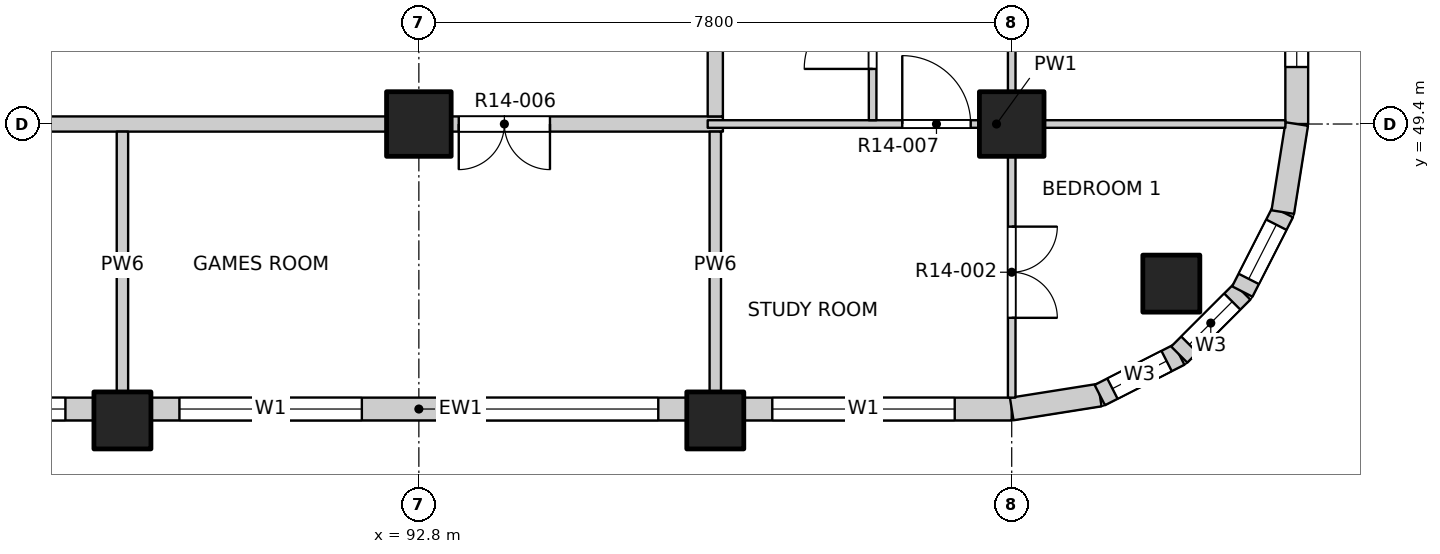
"""IFC4 building model, lengths in metres.
Left out: names, types, materials, properties, quantities, classifications, styles, units other than length and angle.
Written with IfcOpenShell. Run it as: python <this file> out.ifc"""

import sys

from ifc_helpers import new_model, si_unit, direction, frame, frame_2d, origin, origin_2d, place, context, subcontext, project, spatial, rectangle, extrude, element, fill, save


model = new_model("IFC4")
c1 = context("Model", 3, precision=1e-05, world=origin(), true_north=direction((0.0, 1.0)))
c2 = subcontext(c1, "Body", "Model", "MODEL_VIEW")
j1 = project(units=[si_unit("LENGTHUNIT", "METRE"), si_unit("PLANEANGLEUNIT", "RADIAN")], contexts=[c1])
p1 = place(None, origin())
s1 = spatial("IfcSite", under=j1, at=p1, CompositionType="ELEMENT")
p2 = place(p1, origin())
s2 = spatial("IfcBuilding", under=s1, at=p2, CompositionType="ELEMENT")
p3 = place(p2, frame((0.0, 0.0, 152.0)))
s3 = spatial("IfcBuildingStorey", under=s2, at=p3, CompositionType="ELEMENT", Elevation=152.0)
for number, where, z_axis, x_axis in (
    (1, (102.7, 47.3, -0.25), (0.0, 0.0, 1.0), (1.0, 0.0, 0.0)),
    (2, (88.9, 45.5, -0.25), (0.0, 0.0, 1.0), (1.0, 0.0, 0.0)),
    (3, (96.7, 45.5, -0.25), (0.0, 0.0, 1.0), (1.0, 0.0, 0.0)),
):
    element("IfcColumn", number, at=place(p3, frame(where, z_axis=z_axis, x_axis=x_axis)), inside=s3, PredefinedType="COLUMN", context=c2, shape_type="SweptSolid", body=[
        extrude(rectangle(XDim=0.75, YDim=0.75, at=origin_2d()), origin(), (0.0, 0.0, 1.0), 3.4),
    ])
for number, where, z_axis, x_axis in (
    (4, (92.8, 49.4, -0.25), (0.0, 0.0, 1.0), (1.0, 0.0, 0.0)),
    (5, (100.6, 49.4, -0.25), (0.0, 0.0, 1.0), (1.0, 0.0, 0.0)),
):
    element("IfcColumn", number, at=place(p3, frame(where, z_axis=z_axis, x_axis=x_axis)), inside=s3, PredefinedType="COLUMN", context=c2, shape_type="SweptSolid", body=[
        extrude(rectangle(XDim=0.85, YDim=0.85, at=origin_2d()), origin(), (0.0, 0.0, 1.0), 3.4),
    ])
p4 = place(p3, frame((81.475, 45.65, 0.0), z_axis=(0.0, 0.0, 1.0), x_axis=(1.0, 0.0, 0.0)))
e6 = element("IfcWall", 6, at=p4, inside=s3, PredefinedType="SOLIDWALL", context=c2, shape_type="SweptSolid", body=[
    extrude(rectangle(XDim=7.05, YDim=0.3, at=frame_2d((3.525, 0.0))), origin(), (0.0, 0.0, 1.0), 2.7),
])
p5 = place(p4, frame((0.375, 0.0, 0.9)))
e7 = element("IfcOpeningElement", 7, at=p5, cuts=e6, PredefinedType="OPENING", context=c2, shape_type="SweptSolid", body=[
    extrude(rectangle(XDim=2.4, YDim=1.8, at=frame_2d((1.2, 0.9))), frame((0.0, 0.16, 0.0), z_axis=(0.0, -1.0, 0.0), x_axis=(1.0, 0.0, 0.0)), (0.0, 0.0, 1.0), 0.32),
])
p6 = place(p4, frame((4.275, 0.0, 0.9)))
e8 = element("IfcOpeningElement", 8, at=p6, cuts=e6, PredefinedType="OPENING", context=c2, shape_type="SweptSolid", body=[
    extrude(rectangle(XDim=2.4, YDim=1.8, at=frame_2d((1.2, 0.9))), frame((0.0, 0.16, 0.0), z_axis=(0.0, -1.0, 0.0), x_axis=(1.0, 0.0, 0.0)), (0.0, 0.0, 1.0), 0.32),
])
p7 = place(p3, frame((89.275, 45.65, 0.0), z_axis=(0.0, 0.0, 1.0), x_axis=(1.0, 0.0, 0.0)))
e9 = element("IfcWall", 9, at=p7, inside=s3, PredefinedType="SOLIDWALL", context=c2, shape_type="SweptSolid", body=[
    extrude(rectangle(XDim=7.05, YDim=0.3, at=frame_2d((3.525, 0.0))), origin(), (0.0, 0.0, 1.0), 2.7),
])
p8 = place(p7, frame((0.375, 0.0, 0.9)))
e10 = element("IfcOpeningElement", 10, at=p8, cuts=e9, PredefinedType="OPENING", context=c2, shape_type="SweptSolid", body=[
    extrude(rectangle(XDim=2.4, YDim=1.8, at=frame_2d((1.2, 0.9))), frame((0.0, 0.16, 0.0), z_axis=(0.0, -1.0, 0.0), x_axis=(1.0, 0.0, 0.0)), (0.0, 0.0, 1.0), 0.32),
])
p9 = place(p7, frame((4.275, 0.0, 0.9)))
e11 = element("IfcOpeningElement", 11, at=p9, cuts=e9, PredefinedType="OPENING", context=c2, shape_type="SweptSolid", body=[
    extrude(rectangle(XDim=2.4, YDim=1.8, at=frame_2d((1.2, 0.9))), frame((0.0, 0.16, 0.0), z_axis=(0.0, -1.0, 0.0), x_axis=(1.0, 0.0, 0.0)), (0.0, 0.0, 1.0), 0.32),
])
p10 = place(p3, frame((97.075, 45.65, 0.0), z_axis=(0.0, 0.0, 1.0), x_axis=(1.0, 0.0, 0.0)))
e12 = element("IfcWall", 12, at=p10, inside=s3, PredefinedType="SOLIDWALL", context=c2, shape_type="SweptSolid", body=[
    extrude(rectangle(XDim=3.525, YDim=0.3, at=frame_2d((1.763, 0.0))), origin(), (0.0, 0.0, 1.0), 2.7),
])
p11 = place(p10, frame((0.375, 0.0, 0.9)))
e13 = element("IfcOpeningElement", 13, at=p11, cuts=e12, PredefinedType="OPENING", context=c2, shape_type="SweptSolid", body=[
    extrude(rectangle(XDim=2.4, YDim=1.8, at=frame_2d((1.2, 0.9))), frame((0.0, 0.16, 0.0), z_axis=(0.0, -1.0, 0.0), x_axis=(1.0, 0.0, 0.0)), (0.0, 0.0, 1.0), 0.32),
])
p12 = place(p3, frame((104.35, 49.4, 0.0), z_axis=(0.0, 0.0, 1.0), x_axis=(0.0, 1.0, 0.0)))
e14 = element("IfcWall", 14, at=p12, inside=s3, PredefinedType="SOLIDWALL", context=c2, shape_type="SweptSolid", body=[
    extrude(rectangle(XDim=3.525, YDim=0.3, at=frame_2d((1.763, 0.0))), origin(), (0.0, 0.0, 1.0), 2.7),
])
p13 = place(p12, frame((0.75, 0.0, 0.9)))
e15 = element("IfcOpeningElement", 15, at=p13, cuts=e14, PredefinedType="OPENING", context=c2, shape_type="SweptSolid", body=[
    extrude(rectangle(XDim=2.4, YDim=1.8, at=frame_2d((1.2, 0.9))), frame((0.0, 0.16, 0.0), z_axis=(0.0, -1.0, 0.0), x_axis=(1.0, 0.0, 0.0)), (0.0, 0.0, 1.0), 0.32),
])
p14 = place(p3, frame((100.6, 45.65, 0.0), z_axis=(0.0, 0.0, 1.0), x_axis=(0.987678452879, 0.156496880861, 0.0)))
e16 = element("IfcWall", 16, at=p14, inside=s3, PredefinedType="SOLIDWALL", context=c2, shape_type="SweptSolid", body=[
    extrude(rectangle(XDim=1.173, YDim=0.3, at=frame_2d((0.586, 0.0))), origin(), (0.0, 0.0, 1.0), 2.7),
])
p15 = place(p3, frame((101.759, 45.833, 0.0), z_axis=(0.0, 0.0, 1.0), x_axis=(0.890988677504, 0.454025524128, 0.0)))
e17 = element("IfcWall", 17, at=p15, inside=s3, PredefinedType="SOLIDWALL", context=c2, shape_type="SweptSolid", body=[
    extrude(rectangle(XDim=1.173, YDim=0.3, at=frame_2d((0.587, 0.0))), origin(), (0.0, 0.0, 1.0), 2.7),
])
p16 = place(p15, frame((0.187, 0.0, 0.9)))
e18 = element("IfcOpeningElement", 18, at=p16, cuts=e17, PredefinedType="OPENING", context=c2, shape_type="SweptSolid", body=[
    extrude(rectangle(XDim=0.8, YDim=1.2, at=frame_2d((0.4, 0.6))), frame((0.0, 0.16, 0.0), z_axis=(0.0, -1.0, 0.0), x_axis=(1.0, 0.0, 0.0)), (0.0, 0.0, 1.0), 0.32),
])
p17 = place(p3, frame((102.804, 46.366, 0.0), z_axis=(0.0, 0.0, 1.0), x_axis=(0.707106781187, 0.707106781187, 0.0)))
e19 = element("IfcWall", 19, at=p17, inside=s3, PredefinedType="SOLIDWALL", context=c2, shape_type="SweptSolid", body=[
    extrude(rectangle(XDim=1.173, YDim=0.3, at=frame_2d((0.586, 0.0))), origin(), (0.0, 0.0, 1.0), 2.7),
])
p18 = place(p17, frame((0.187, 0.0, 0.9)))
e20 = element("IfcOpeningElement", 20, at=p18, cuts=e19, PredefinedType="OPENING", context=c2, shape_type="SweptSolid", body=[
    extrude(rectangle(XDim=0.8, YDim=1.2, at=frame_2d((0.4, 0.6))), frame((0.0, 0.16, 0.0), z_axis=(0.0, -1.0, 0.0), x_axis=(1.0, 0.0, 0.0)), (0.0, 0.0, 1.0), 0.32),
])
p19 = place(p3, frame((103.634, 47.196, 0.0), z_axis=(0.0, 0.0, 1.0), x_axis=(0.454025524128, 0.890988677504, 0.0)))
e21 = element("IfcWall", 21, at=p19, inside=s3, PredefinedType="SOLIDWALL", context=c2, shape_type="SweptSolid", body=[
    extrude(rectangle(XDim=1.173, YDim=0.3, at=frame_2d((0.587, 0.0))), origin(), (0.0, 0.0, 1.0), 2.7),
])
p20 = place(p19, frame((0.187, 0.0, 0.9)))
e22 = element("IfcOpeningElement", 22, at=p20, cuts=e21, PredefinedType="OPENING", context=c2, shape_type="SweptSolid", body=[
    extrude(rectangle(XDim=0.8, YDim=1.2, at=frame_2d((0.4, 0.6))), frame((0.0, 0.16, 0.0), z_axis=(0.0, -1.0, 0.0), x_axis=(1.0, 0.0, 0.0)), (0.0, 0.0, 1.0), 0.32),
])
p21 = place(p3, frame((104.167, 48.241, 0.0), z_axis=(0.0, 0.0, 1.0), x_axis=(0.156496880861, 0.987678452879, 0.0)))
e23 = element("IfcWall", 23, at=p21, inside=s3, PredefinedType="SOLIDWALL", context=c2, shape_type="SweptSolid", body=[
    extrude(rectangle(XDim=1.173, YDim=0.3, at=frame_2d((0.586, 0.0))), origin(), (0.0, 0.0, 1.0), 2.7),
])
p22 = place(p3, frame((73.2, 49.4, 0.0), z_axis=(0.0, 0.0, 1.0), x_axis=(1.0, 0.0, 0.0)))
e24 = element("IfcWall", 24, at=p22, inside=s3, PredefinedType="PARTITIONING", context=c2, shape_type="SweptSolid", body=[
    extrude(rectangle(XDim=23.6, YDim=0.2, at=frame_2d((11.8, 0.0))), origin(), (0.0, 0.0, 1.0), 3.15),
])
p23 = place(p22, frame((4.525, 0.0, 0.0)))
e25 = element("IfcOpeningElement", 25, at=p23, cuts=e24, PredefinedType="OPENING", context=c2, shape_type="SweptSolid", body=[
    extrude(rectangle(XDim=1.2, YDim=2.1, at=frame_2d((0.6, 1.05))), frame((0.0, 0.11, 0.0), z_axis=(0.0, -1.0, 0.0), x_axis=(1.0, 0.0, 0.0)), (0.0, 0.0, 1.0), 0.22),
])
p24 = place(p22, frame((12.325, 0.0, 0.0)))
e26 = element("IfcOpeningElement", 26, at=p24, cuts=e24, PredefinedType="OPENING", context=c2, shape_type="SweptSolid", body=[
    extrude(rectangle(XDim=1.2, YDim=2.1, at=frame_2d((0.6, 1.05))), frame((0.0, 0.11, 0.0), z_axis=(0.0, -1.0, 0.0), x_axis=(1.0, 0.0, 0.0)), (0.0, 0.0, 1.0), 0.22),
])
p25 = place(p22, frame((20.125, 0.0, 0.0)))
e27 = element("IfcOpeningElement", 27, at=p25, cuts=e24, PredefinedType="OPENING", context=c2, shape_type="SweptSolid", body=[
    extrude(rectangle(XDim=1.2, YDim=2.1, at=frame_2d((0.6, 1.05))), frame((0.0, 0.11, 0.0), z_axis=(0.0, -1.0, 0.0), x_axis=(1.0, 0.0, 0.0)), (0.0, 0.0, 1.0), 0.22),
])
p26 = place(p3, frame((96.6, 49.4, 0.0), z_axis=(0.0, 0.0, 1.0), x_axis=(1.0, 0.0, 0.0)))
e28 = element("IfcWall", 28, at=p26, inside=s3, PredefinedType="PARTITIONING", context=c2, shape_type="SweptSolid", body=[
    extrude(rectangle(XDim=7.6, YDim=0.1, at=frame_2d((3.8, 0.0))), origin(), (0.0, 0.0, 1.0), 3.15),
])
p27 = place(p26, frame((2.56, 0.0, 0.0)))
e29 = element("IfcOpeningElement", 29, at=p27, cuts=e28, PredefinedType="OPENING", context=c2, shape_type="SweptSolid", body=[
    extrude(rectangle(XDim=0.9, YDim=2.1, at=frame_2d((0.45, 1.05))), frame((0.0, 0.06, 0.0), z_axis=(0.0, -1.0, 0.0), x_axis=(1.0, 0.0, 0.0)), (0.0, 0.0, 1.0), 0.12),
])
for number, where, z_axis, x_axis in (
    (30, (88.9, 45.8, 0.0), (0.0, 0.0, 1.0), (0.0, 1.0, 0.0)),
    (31, (96.7, 45.8, 0.0), (0.0, 0.0, 1.0), (0.0, 1.0, 0.0)),
):
    element("IfcWall", number, at=place(p3, frame(where, z_axis=z_axis, x_axis=x_axis)), inside=s3, PredefinedType="PARTITIONING", context=c2, shape_type="SweptSolid", body=[
        extrude(rectangle(XDim=3.5, YDim=0.15, at=frame_2d((1.75, 0.0))), origin(), (0.0, 0.0, 1.0), 3.15),
    ])
p28 = place(p3, frame((96.7, 49.5, 0.0), z_axis=(0.0, 0.0, 1.0), x_axis=(0.0, 1.0, 0.0)))
e32 = element("IfcWall", 32, at=p28, inside=s3, PredefinedType="PARTITIONING", context=c2, shape_type="SweptSolid", body=[
    extrude(rectangle(XDim=34.7, YDim=0.2, at=frame_2d((17.35, 0.0))), origin(), (0.0, 0.0, 1.0), 3.15),
])
p29 = place(p28, frame((3.225, 0.0, 0.0)))
e33 = element("IfcOpeningElement", 33, at=p29, cuts=e32, PredefinedType="OPENING", context=c2, shape_type="SweptSolid", body=[
    extrude(rectangle(XDim=1.0, YDim=2.1, at=frame_2d((0.5, 1.05))), frame((0.0, 0.11, 0.0), z_axis=(0.0, -1.0, 0.0), x_axis=(1.0, 0.0, 0.0)), (0.0, 0.0, 1.0), 0.22),
])
p30 = place(p28, frame((19.775, 0.0, 0.0)))
e34 = element("IfcOpeningElement", 34, at=p30, cuts=e32, PredefinedType="OPENING", context=c2, shape_type="SweptSolid", body=[
    extrude(rectangle(XDim=1.0, YDim=2.1, at=frame_2d((0.5, 1.05))), frame((0.0, 0.11, 0.0), z_axis=(0.0, -1.0, 0.0), x_axis=(1.0, 0.0, 0.0)), (0.0, 0.0, 1.0), 0.22),
])
p31 = place(p28, frame((24.125, 0.0, 0.0)))
e35 = element("IfcOpeningElement", 35, at=p31, cuts=e32, PredefinedType="OPENING", context=c2, shape_type="SweptSolid", body=[
    extrude(rectangle(XDim=1.0, YDim=2.1, at=frame_2d((0.5, 1.05))), frame((0.0, 0.11, 0.0), z_axis=(0.0, -1.0, 0.0), x_axis=(1.0, 0.0, 0.0)), (0.0, 0.0, 1.0), 0.22),
])
p32 = place(p3, frame((98.77, 49.45, 0.0), z_axis=(0.0, 0.0, 1.0), x_axis=(0.0, 1.0, 0.0)))
e36 = element("IfcWall", 36, at=p32, inside=s3, PredefinedType="PARTITIONING", context=c2, shape_type="SweptSolid", body=[
    extrude(rectangle(XDim=4.4, YDim=0.1, at=frame_2d((2.2, 0.0))), origin(), (0.0, 0.0, 1.0), 3.15),
])
p33 = place(p32, frame((0.675, 0.0, 0.0)))
e37 = element("IfcOpeningElement", 37, at=p33, cuts=e36, PredefinedType="OPENING", context=c2, shape_type="SweptSolid", body=[
    extrude(rectangle(XDim=0.9, YDim=2.1, at=frame_2d((0.45, 1.05))), frame((0.0, 0.06, 0.0), z_axis=(0.0, -1.0, 0.0), x_axis=(1.0, 0.0, 0.0)), (0.0, 0.0, 1.0), 0.12),
])
p34 = place(p32, frame((2.975, 0.0, 0.0)))
e38 = element("IfcOpeningElement", 38, at=p34, cuts=e36, PredefinedType="OPENING", context=c2, shape_type="SweptSolid", body=[
    extrude(rectangle(XDim=0.8, YDim=2.1, at=frame_2d((0.4, 1.05))), frame((0.0, 0.06, 0.0), z_axis=(0.0, -1.0, 0.0), x_axis=(1.0, 0.0, 0.0)), (0.0, 0.0, 1.0), 0.12),
])
p35 = place(p3, frame((100.6, 45.8, 0.0), z_axis=(0.0, 0.0, 1.0), x_axis=(0.0, 1.0, 0.0)))
e39 = element("IfcWall", 39, at=p35, inside=s3, PredefinedType="PARTITIONING", context=c2, shape_type="SweptSolid", body=[
    extrude(rectangle(XDim=38.4, YDim=0.1, at=frame_2d((19.2, 0.0))), origin(), (0.0, 0.0, 1.0), 3.15),
])
p36 = place(p35, frame((1.05, 0.0, 0.0)))
e40 = element("IfcOpeningElement", 40, at=p36, cuts=e39, PredefinedType="OPENING", context=c2, shape_type="SweptSolid", body=[
    extrude(rectangle(XDim=1.2, YDim=2.1, at=frame_2d((0.6, 1.05))), frame((0.0, 0.06, 0.0), z_axis=(0.0, -1.0, 0.0), x_axis=(1.0, 0.0, 0.0)), (0.0, 0.0, 1.0), 0.12),
])
p37 = place(p35, frame((5.1, 0.0, 0.0)))
e41 = element("IfcOpeningElement", 41, at=p37, cuts=e39, PredefinedType="OPENING", context=c2, shape_type="SweptSolid", body=[
    extrude(rectangle(XDim=0.9, YDim=2.1, at=frame_2d((0.45, 1.05))), frame((0.0, 0.06, 0.0), z_axis=(0.0, -1.0, 0.0), x_axis=(1.0, 0.0, 0.0)), (0.0, 0.0, 1.0), 0.12),
])
p38 = place(p35, frame((9.0, 0.0, 0.0)))
e42 = element("IfcOpeningElement", 42, at=p38, cuts=e39, PredefinedType="OPENING", context=c2, shape_type="SweptSolid", body=[
    extrude(rectangle(XDim=0.9, YDim=2.1, at=frame_2d((0.45, 1.05))), frame((0.0, 0.06, 0.0), z_axis=(0.0, -1.0, 0.0), x_axis=(1.0, 0.0, 0.0)), (0.0, 0.0, 1.0), 0.12),
])
p39 = place(p35, frame((12.9, 0.0, 0.0)))
e43 = element("IfcOpeningElement", 43, at=p39, cuts=e39, PredefinedType="OPENING", context=c2, shape_type="SweptSolid", body=[
    extrude(rectangle(XDim=0.9, YDim=2.1, at=frame_2d((0.45, 1.05))), frame((0.0, 0.06, 0.0), z_axis=(0.0, -1.0, 0.0), x_axis=(1.0, 0.0, 0.0)), (0.0, 0.0, 1.0), 0.12),
])
p40 = place(p35, frame((16.8, 0.0, 0.0)))
e44 = element("IfcOpeningElement", 44, at=p40, cuts=e39, PredefinedType="OPENING", context=c2, shape_type="SweptSolid", body=[
    extrude(rectangle(XDim=0.9, YDim=2.1, at=frame_2d((0.45, 1.05))), frame((0.0, 0.06, 0.0), z_axis=(0.0, -1.0, 0.0), x_axis=(1.0, 0.0, 0.0)), (0.0, 0.0, 1.0), 0.12),
])
p41 = place(p35, frame((20.7, 0.0, 0.0)))
e45 = element("IfcOpeningElement", 45, at=p41, cuts=e39, PredefinedType="OPENING", context=c2, shape_type="SweptSolid", body=[
    extrude(rectangle(XDim=0.9, YDim=2.1, at=frame_2d((0.45, 1.05))), frame((0.0, 0.06, 0.0), z_axis=(0.0, -1.0, 0.0), x_axis=(1.0, 0.0, 0.0)), (0.0, 0.0, 1.0), 0.12),
])
p42 = place(p35, frame((24.6, 0.0, 0.0)))
e46 = element("IfcOpeningElement", 46, at=p42, cuts=e39, PredefinedType="OPENING", context=c2, shape_type="SweptSolid", body=[
    extrude(rectangle(XDim=0.9, YDim=2.1, at=frame_2d((0.45, 1.05))), frame((0.0, 0.06, 0.0), z_axis=(0.0, -1.0, 0.0), x_axis=(1.0, 0.0, 0.0)), (0.0, 0.0, 1.0), 0.12),
])
p43 = place(p35, frame((28.5, 0.0, 0.0)))
e47 = element("IfcOpeningElement", 47, at=p43, cuts=e39, PredefinedType="OPENING", context=c2, shape_type="SweptSolid", body=[
    extrude(rectangle(XDim=0.9, YDim=2.1, at=frame_2d((0.45, 1.05))), frame((0.0, 0.06, 0.0), z_axis=(0.0, -1.0, 0.0), x_axis=(1.0, 0.0, 0.0)), (0.0, 0.0, 1.0), 0.12),
])
p44 = place(p35, frame((32.4, 0.0, 0.0)))
e48 = element("IfcOpeningElement", 48, at=p44, cuts=e39, PredefinedType="OPENING", context=c2, shape_type="SweptSolid", body=[
    extrude(rectangle(XDim=0.9, YDim=2.1, at=frame_2d((0.45, 1.05))), frame((0.0, 0.06, 0.0), z_axis=(0.0, -1.0, 0.0), x_axis=(1.0, 0.0, 0.0)), (0.0, 0.0, 1.0), 0.12),
])
p45 = place(p35, frame((36.15, 0.0, 0.0)))
e49 = element("IfcOpeningElement", 49, at=p45, cuts=e39, PredefinedType="OPENING", context=c2, shape_type="SweptSolid", body=[
    extrude(rectangle(XDim=1.2, YDim=2.1, at=frame_2d((0.6, 1.05))), frame((0.0, 0.06, 0.0), z_axis=(0.0, -1.0, 0.0), x_axis=(1.0, 0.0, 0.0)), (0.0, 0.0, 1.0), 0.12),
])
p46 = place(p6, origin())
e50 = element("IfcWindow", 50, at=p46, inside=s3, PartitioningType="DOUBLE_PANEL_VERTICAL", PredefinedType="WINDOW", context=c2, shape_type="SweptSolid", body=[
    extrude(rectangle(XDim=2.4, YDim=1.8, at=frame_2d((1.2, 0.9))), frame((0.0, 0.03, 0.0), z_axis=(0.0, -1.0, 0.0), x_axis=(1.0, 0.0, 0.0)), (0.0, 0.0, 1.0), 0.06),
])
fill(e8, e50)
p47 = place(p8, origin())
e51 = element("IfcWindow", 51, at=p47, inside=s3, PartitioningType="DOUBLE_PANEL_VERTICAL", PredefinedType="WINDOW", context=c2, shape_type="SweptSolid", body=[
    extrude(rectangle(XDim=2.4, YDim=1.8, at=frame_2d((1.2, 0.9))), frame((0.0, 0.03, 0.0), z_axis=(0.0, -1.0, 0.0), x_axis=(1.0, 0.0, 0.0)), (0.0, 0.0, 1.0), 0.06),
])
fill(e10, e51)
p48 = place(p9, origin())
e52 = element("IfcWindow", 52, at=p48, inside=s3, PartitioningType="DOUBLE_PANEL_VERTICAL", PredefinedType="WINDOW", context=c2, shape_type="SweptSolid", body=[
    extrude(rectangle(XDim=2.4, YDim=1.8, at=frame_2d((1.2, 0.9))), frame((0.0, 0.03, 0.0), z_axis=(0.0, -1.0, 0.0), x_axis=(1.0, 0.0, 0.0)), (0.0, 0.0, 1.0), 0.06),
])
fill(e11, e52)
p49 = place(p11, origin())
e53 = element("IfcWindow", 53, at=p49, inside=s3, PartitioningType="DOUBLE_PANEL_VERTICAL", PredefinedType="WINDOW", context=c2, shape_type="SweptSolid", body=[
    extrude(rectangle(XDim=2.4, YDim=1.8, at=frame_2d((1.2, 0.9))), frame((0.0, 0.03, 0.0), z_axis=(0.0, -1.0, 0.0), x_axis=(1.0, 0.0, 0.0)), (0.0, 0.0, 1.0), 0.06),
])
fill(e13, e53)
p50 = place(p13, origin())
e54 = element("IfcWindow", 54, at=p50, inside=s3, PartitioningType="DOUBLE_PANEL_VERTICAL", PredefinedType="WINDOW", context=c2, shape_type="SweptSolid", body=[
    extrude(rectangle(XDim=2.4, YDim=1.8, at=frame_2d((1.2, 0.9))), frame((0.0, 0.03, 0.0), z_axis=(0.0, -1.0, 0.0), x_axis=(1.0, 0.0, 0.0)), (0.0, 0.0, 1.0), 0.06),
])
fill(e15, e54)
p51 = place(p16, origin())
e55 = element("IfcWindow", 55, at=p51, inside=s3, PartitioningType="SINGLE_PANEL", PredefinedType="WINDOW", context=c2, shape_type="SweptSolid", body=[
    extrude(rectangle(XDim=0.8, YDim=1.2, at=frame_2d((0.4, 0.6))), frame((0.0, 0.03, 0.0), z_axis=(0.0, -1.0, 0.0), x_axis=(1.0, 0.0, 0.0)), (0.0, 0.0, 1.0), 0.06),
])
fill(e18, e55)
p52 = place(p18, origin())
e56 = element("IfcWindow", 56, at=p52, inside=s3, PartitioningType="SINGLE_PANEL", PredefinedType="WINDOW", context=c2, shape_type="SweptSolid", body=[
    extrude(rectangle(XDim=0.8, YDim=1.2, at=frame_2d((0.4, 0.6))), frame((0.0, 0.03, 0.0), z_axis=(0.0, -1.0, 0.0), x_axis=(1.0, 0.0, 0.0)), (0.0, 0.0, 1.0), 0.06),
])
fill(e20, e56)
p53 = place(p20, origin())
e57 = element("IfcWindow", 57, at=p53, inside=s3, PartitioningType="SINGLE_PANEL", PredefinedType="WINDOW", context=c2, shape_type="SweptSolid", body=[
    extrude(rectangle(XDim=0.8, YDim=1.2, at=frame_2d((0.4, 0.6))), frame((0.0, 0.03, 0.0), z_axis=(0.0, -1.0, 0.0), x_axis=(1.0, 0.0, 0.0)), (0.0, 0.0, 1.0), 0.06),
])
fill(e22, e57)
p54 = place(p36, origin())
e58 = element("IfcDoor", 58, at=p54, inside=s3, OperationType="DOUBLE_DOOR_SINGLE_SWING", PredefinedType="DOOR", context=c2, shape_type="SweptSolid", body=[
    extrude(rectangle(XDim=1.2, YDim=2.1, at=frame_2d((0.6, 1.05))), frame((0.0, 0.025, 0.0), z_axis=(0.0, -1.0, 0.0), x_axis=(1.0, 0.0, 0.0)), (0.0, 0.0, 1.0), 0.05),
])
fill(e40, e58)
p55 = place(p25, origin())
e59 = element("IfcDoor", 59, at=p55, inside=s3, OperationType="DOUBLE_DOOR_SINGLE_SWING", PredefinedType="DOOR", context=c2, shape_type="SweptSolid", body=[
    extrude(rectangle(XDim=1.2, YDim=2.1, at=frame_2d((0.6, 1.05))), frame((0.0, 0.025, 0.0), z_axis=(0.0, -1.0, 0.0), x_axis=(1.0, 0.0, 0.0)), (0.0, 0.0, 1.0), 0.05),
])
fill(e27, e59)
p56 = place(p27, origin())
e60 = element("IfcDoor", 60, at=p56, inside=s3, OperationType="SINGLE_SWING_LEFT", PredefinedType="DOOR", context=c2, shape_type="SweptSolid", body=[
    extrude(rectangle(XDim=0.9, YDim=2.1, at=frame_2d((0.45, 1.05))), frame((0.0, 0.025, 0.0), z_axis=(0.0, -1.0, 0.0), x_axis=(1.0, 0.0, 0.0)), (0.0, 0.0, 1.0), 0.05),
])
fill(e29, e60)
p57 = place(p33, origin())
e61 = element("IfcDoor", 61, at=p57, inside=s3, OperationType="SINGLE_SWING_LEFT", PredefinedType="DOOR", context=c2, shape_type="SweptSolid", body=[
    extrude(rectangle(XDim=0.9, YDim=2.1, at=frame_2d((0.45, 1.05))), frame((0.0, 0.025, 0.0), z_axis=(0.0, -1.0, 0.0), x_axis=(1.0, 0.0, 0.0)), (0.0, 0.0, 1.0), 0.05),
])
fill(e37, e61)
save(model, sys.argv[1])
